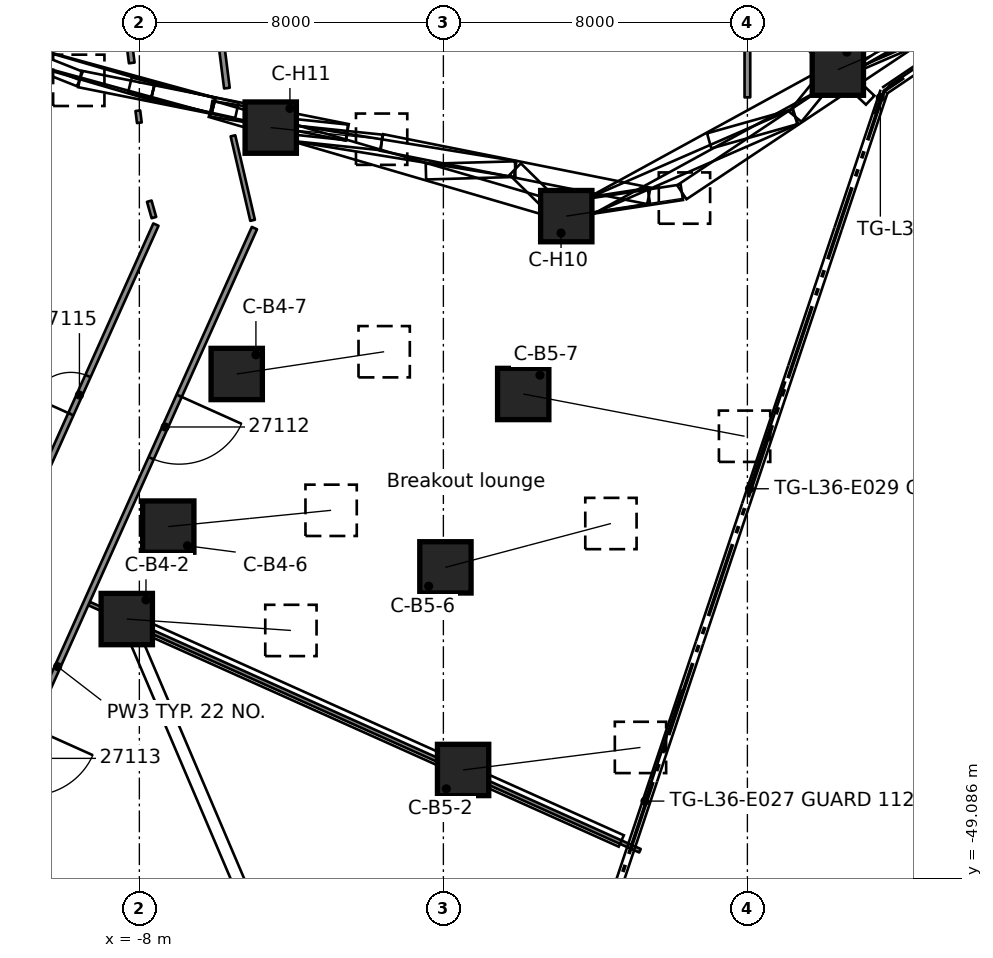
"""IFC4 building model, lengths in metres.
Left out: names, types, materials, properties, quantities, classifications, styles, units other than length and angle.
Written with IfcOpenShell. Run it as: python <this file> out.ifc"""

import sys

from ifc_helpers import new_model, si_unit, direction, frame, frame_2d, origin, origin_2d, place, context, subcontext, project, spatial, rectangle, extrude, element, fill, save


model = new_model("IFC4")
c1 = context("Model", 3, precision=1e-05, world=origin(), true_north=direction((0.0, 1.0)))
c2 = subcontext(c1, "Body", "Model", "MODEL_VIEW")
j1 = project(units=[si_unit("LENGTHUNIT", "METRE"), si_unit("PLANEANGLEUNIT", "RADIAN")], contexts=[c1])
p1 = place(None, origin())
s1 = spatial("IfcSite", under=j1, at=p1, CompositionType="ELEMENT")
p2 = place(p1, origin())
s2 = spatial("IfcBuilding", under=s1, at=p2, CompositionType="ELEMENT")
p3 = place(p2, frame((0.0, 0.0, 141.2)))
s3 = spatial("IfcBuildingStorey", under=s2, at=p3, CompositionType="ELEMENT", Elevation=141.2)
p4 = place(p3, frame((-8.331, -42.26, 0.535), z_axis=(0.790766933588, -0.05493485735, 0.60964728999), x_axis=(0.069303320034, 0.997595634429, 0.0)))
e1 = element("IfcColumn", 1, at=p4, inside=s3, PredefinedType="COLUMN", context=c2, shape_type="SweptSolid", body=[
    extrude(rectangle(XDim=1.35, YDim=1.35, at=origin_2d()), origin(), (0.0, 0.0, 1.0), 5.462),
])
p5 = place(p3, frame((-7.239, -39.827, 0.534), z_axis=(0.786948730103, 0.07860071357, 0.611991522829), x_axis=(-0.099385838219, 0.995048971238, 0.0)))
e2 = element("IfcColumn", 2, at=p5, inside=s3, PredefinedType="COLUMN", context=c2, shape_type="SweptSolid", body=[
    extrude(rectangle(XDim=1.35, YDim=1.35, at=origin_2d()), origin(), (0.0, 0.0, 1.0), 5.445),
])
p6 = place(p3, frame((-5.438, -35.812, 0.512), z_axis=(0.749479055417, 0.113185862887, 0.652280695663), x_axis=(-0.14932615089, 0.988787995811, 0.0)))
e3 = element("IfcColumn", 3, at=p6, inside=s3, PredefinedType="COLUMN", context=c2, shape_type="SweptSolid", body=[
    extrude(rectangle(XDim=1.35, YDim=1.35, at=origin_2d()), origin(), (0.0, 0.0, 1.0), 5.177),
])
p7 = place(p3, frame((0.519, -46.231, 0.553), z_axis=(0.812671730055, 0.103241612568, 0.57350311996), x_axis=(-0.12602683971, 0.992026832133, 0.0)))
e4 = element("IfcColumn", 4, at=p7, inside=s3, PredefinedType="COLUMN", context=c2, shape_type="SweptSolid", body=[
    extrude(rectangle(XDim=1.35, YDim=1.35, at=origin_2d()), origin(), (0.0, 0.0, 1.0), 5.744),
])
p8 = place(p3, frame((0.054, -40.9, 0.544), z_axis=(0.778816229467, 0.20633958406, 0.592342178786), x_axis=(-0.25610405903, 0.966649218149, 0.0)))
e5 = element("IfcColumn", 5, at=p8, inside=s3, PredefinedType="COLUMN", context=c2, shape_type="SweptSolid", body=[
    extrude(rectangle(XDim=1.35, YDim=1.35, at=origin_2d()), origin(), (0.0, 0.0, 1.0), 5.592),
])
p9 = place(p3, frame((2.101, -36.338, 0.594), z_axis=(0.863633920008, -0.164879186288, 0.476394066022), x_axis=(0.187526397263, 0.982259563623, 0.0)))
e6 = element("IfcColumn", 6, at=p9, inside=s3, PredefinedType="COLUMN", context=c2, shape_type="SweptSolid", body=[
    extrude(rectangle(XDim=1.35, YDim=1.35, at=origin_2d()), origin(), (0.0, 0.0, 1.0), 6.745),
])
p10 = place(p3, frame((10.38, -27.804, 0.431), z_axis=(0.58632004256, 0.25234228845, 0.769774107874), x_axis=(-0.395324778721, 0.918541408609, 0.0)))
e7 = element("IfcColumn", 7, at=p10, inside=s3, PredefinedType="COLUMN", context=c2, shape_type="SweptSolid", body=[
    extrude(rectangle(XDim=1.35, YDim=1.35, at=origin_2d()), origin(), (0.0, 0.0, 1.0), 4.597),
])
p11 = place(p3, frame((3.234, -31.658, 0.451), z_axis=(0.661134708716, 0.100942539324, 0.74344569451), x_axis=(-0.150931663907, 0.988544198724, 0.0)))
e8 = element("IfcColumn", 8, at=p11, inside=s3, PredefinedType="COLUMN", context=c2, shape_type="SweptSolid", body=[
    extrude(rectangle(XDim=1.35, YDim=1.35, at=origin_2d()), origin(), (0.0, 0.0, 1.0), 4.704),
])
p12 = place(p3, frame((-4.543, -29.329, 0.431), z_axis=(0.634831676586, -0.066340760045, 0.769797145981), x_axis=(0.10393536505, 0.994584053709, 0.0)))
e9 = element("IfcColumn", 9, at=p12, inside=s3, PredefinedType="COLUMN", context=c2, shape_type="SweptSolid", body=[
    extrude(rectangle(XDim=1.35, YDim=1.35, at=origin_2d()), origin(), (0.0, 0.0, 1.0), 4.596),
])
p13 = place(p3, frame((-12.321, -27.001, 0.431), z_axis=(0.593235257024, -0.23580703144, 0.769718762762), x_axis=(0.369381674958, 0.929277772361, 0.0)))
e10 = element("IfcColumn", 10, at=p13, inside=s3, PredefinedType="COLUMN", context=c2, shape_type="SweptSolid", body=[
    extrude(rectangle(XDim=1.35, YDim=1.35, at=origin_2d()), origin(), (0.0, 0.0, 1.0), 4.597),
])
p14 = place(p3, frame((-9.257, -19.284, 0.0), z_axis=(0.0, 0.0, 1.0), x_axis=(0.125703157539, -0.992067898979, 0.0)))
e11 = element("IfcWall", 11, at=p14, inside=s3, PredefinedType="PARTITIONING", context=c2, shape_type="SweptSolid", body=[
    extrude(rectangle(XDim=8.41, YDim=0.15, at=frame_2d((4.205, 0.0))), origin(), (0.0, 0.0, 1.0), 3.98),
])
p15 = place(p3, frame((-8.04, -28.885, 0.0), z_axis=(0.0, 0.0, 1.0), x_axis=(0.12573301006, -0.992064115963, 0.0)))
e12 = element("IfcWall", 12, at=p15, inside=s3, PredefinedType="PARTITIONING", context=c2, shape_type="SweptSolid", body=[
    extrude(rectangle(XDim=0.318, YDim=0.125, at=frame_2d((0.159, 0.0))), origin(), (0.0, 0.0, 1.0), 3.98),
])
p16 = place(p3, frame((-7.739, -31.265, 0.0), z_axis=(0.0, 0.0, 1.0), x_axis=(0.272417640043, -0.962179104633, 0.0)))
e13 = element("IfcWall", 13, at=p16, inside=s3, PredefinedType="PARTITIONING", context=c2, shape_type="SweptSolid", body=[
    extrude(rectangle(XDim=0.448, YDim=0.125, at=frame_2d((0.224, 0.0))), origin(), (0.0, 0.0, 1.0), 3.98),
])
p17 = place(p3, frame((-5.537, -29.545, 0.0), z_axis=(0.0, 0.0, 1.0), x_axis=(0.22654653271, -0.974000343181, 0.0)))
e14 = element("IfcWall", 14, at=p17, inside=s3, PredefinedType="PARTITIONING", context=c2, shape_type="SweptSolid", body=[
    extrude(rectangle(XDim=2.282, YDim=0.125, at=frame_2d((1.141, 0.0))), origin(), (0.0, 0.0, 1.0), 3.98),
])
p18 = place(p3, frame((-6.963, -18.288, 0.0), z_axis=(0.0, 0.0, 1.0), x_axis=(0.125655911579, -0.992073884287, 0.0)))
e15 = element("IfcWall", 15, at=p18, inside=s3, PredefinedType="PARTITIONING", context=c2, shape_type="SweptSolid", body=[
    extrude(rectangle(XDim=10.082, YDim=0.15, at=frame_2d((5.041, 0.0))), origin(), (0.0, 0.0, 1.0), 3.98),
])
p19 = place(p3, frame((-9.325, -41.851, 0.0), z_axis=(0.0, 0.0, 1.0), x_axis=(0.91237401084, -0.40935762402, 0.0)))
e16 = element("IfcWall", 16, at=p19, inside=s3, PredefinedType="PARTITIONING", context=c2, shape_type="SweptSolid", body=[
    extrude(rectangle(XDim=15.89, YDim=0.1, at=frame_2d((7.945, 0.0))), origin(), (0.0, 0.0, 1.0), 3.98),
])
p20 = place(p3, frame((-4.972, -31.973, 0.0), z_axis=(0.0, 0.0, 1.0), x_axis=(-0.409473513005, -0.912322005734, 0.0)))
e17 = element("IfcWall", 17, at=p20, inside=s3, PredefinedType="PARTITIONING", context=c2, shape_type="SweptSolid", body=[
    extrude(rectangle(XDim=25.294, YDim=0.15, at=frame_2d((12.647, 0.0))), origin(), (0.0, 0.0, 1.0), 3.98),
])
p21 = place(p20, frame((4.836, 0.0, 0.0)))
e18 = element("IfcOpeningElement", 18, at=p21, cuts=e17, PredefinedType="OPENING", context=c2, shape_type="SweptSolid", body=[
    extrude(rectangle(XDim=1.8, YDim=2.1, at=frame_2d((0.9, 1.05))), frame((0.0, 0.085, 0.0), z_axis=(0.0, -1.0, 0.0), x_axis=(1.0, 0.0, 0.0)), (0.0, 0.0, 1.0), 0.17),
])
p22 = place(p20, frame((14.394, 0.0, 0.0)))
e19 = element("IfcOpeningElement", 19, at=p22, cuts=e17, PredefinedType="OPENING", context=c2, shape_type="SweptSolid", body=[
    extrude(rectangle(XDim=1.8, YDim=2.1, at=frame_2d((0.9, 1.05))), frame((0.0, 0.085, 0.0), z_axis=(0.0, -1.0, 0.0), x_axis=(1.0, 0.0, 0.0)), (0.0, 0.0, 1.0), 0.17),
])
p23 = place(p20, frame((22.043, 0.0, 0.0)))
e20 = element("IfcOpeningElement", 20, at=p23, cuts=e17, PredefinedType="OPENING", context=c2, shape_type="SweptSolid", body=[
    extrude(rectangle(XDim=0.9, YDim=2.1, at=frame_2d((0.45, 1.05))), frame((0.0, 0.085, 0.0), z_axis=(0.0, -1.0, 0.0), x_axis=(1.0, 0.0, 0.0)), (0.0, 0.0, 1.0), 0.17),
])
p24 = place(p3, frame((-16.414, -51.602, 0.0), z_axis=(0.0, 0.0, 1.0), x_axis=(0.409428490452, 0.912342211676, 0.0)))
e21 = element("IfcWall", 21, at=p24, inside=s3, PredefinedType="PARTITIONING", context=c2, shape_type="SweptSolid", body=[
    extrude(rectangle(XDim=21.616, YDim=0.15, at=frame_2d((10.808, 0.0))), origin(), (0.0, 0.0, 1.0), 3.98),
])
p25 = place(p24, frame((16.149, 0.0, 0.0)))
e22 = element("IfcOpeningElement", 22, at=p25, cuts=e21, PredefinedType="OPENING", context=c2, shape_type="SweptSolid", body=[
    extrude(rectangle(XDim=1.1, YDim=2.1, at=frame_2d((0.55, 1.05))), frame((0.0, 0.085, 0.0), z_axis=(0.0, -1.0, 0.0), x_axis=(1.0, 0.0, 0.0)), (0.0, 0.0, 1.0), 0.17),
])
p26 = place(p24, frame((6.749, 0.0, 0.0)))
e23 = element("IfcOpeningElement", 23, at=p26, cuts=e21, PredefinedType="OPENING", context=c2, shape_type="SweptSolid", body=[
    extrude(rectangle(XDim=1.1, YDim=2.1, at=frame_2d((0.55, 1.05))), frame((0.0, 0.085, 0.0), z_axis=(0.0, -1.0, 0.0), x_axis=(1.0, 0.0, 0.0)), (0.0, 0.0, 1.0), 0.17),
])
p27 = place(p3, frame((8.0, -28.533, 0.0), z_axis=(0.0, 0.0, 1.0), x_axis=(0.0, 1.0, 0.0)))
e24 = element("IfcWall", 24, at=p27, inside=s3, PredefinedType="PARTITIONING", context=c2, shape_type="SweptSolid", body=[
    extrude(rectangle(XDim=12.858, YDim=0.15, at=frame_2d((6.429, 0.0))), origin(), (0.0, 0.0, 1.0), 3.98),
])
p28 = place(p21, origin())
e25 = element("IfcDoor", 25, at=p28, inside=s3, OperationType="DOUBLE_DOOR_SINGLE_SWING", PredefinedType="DOOR", context=c2, shape_type="SweptSolid", body=[
    extrude(rectangle(XDim=1.8, YDim=2.1, at=frame_2d((0.9, 1.05))), frame((0.0, 0.025, 0.0), z_axis=(0.0, -1.0, 0.0), x_axis=(1.0, 0.0, 0.0)), (0.0, 0.0, 1.0), 0.05),
])
fill(e18, e25)
p29 = place(p25, origin())
e26 = element("IfcDoor", 26, at=p29, inside=s3, OperationType="SINGLE_SWING_RIGHT", PredefinedType="DOOR", context=c2, shape_type="SweptSolid", body=[
    extrude(rectangle(XDim=1.1, YDim=2.1, at=frame_2d((0.55, 1.05))), frame((0.0, 0.025, 0.0), z_axis=(0.0, -1.0, 0.0), x_axis=(1.0, 0.0, 0.0)), (0.0, 0.0, 1.0), 0.05),
])
fill(e22, e26)
save(model, sys.argv[1])
